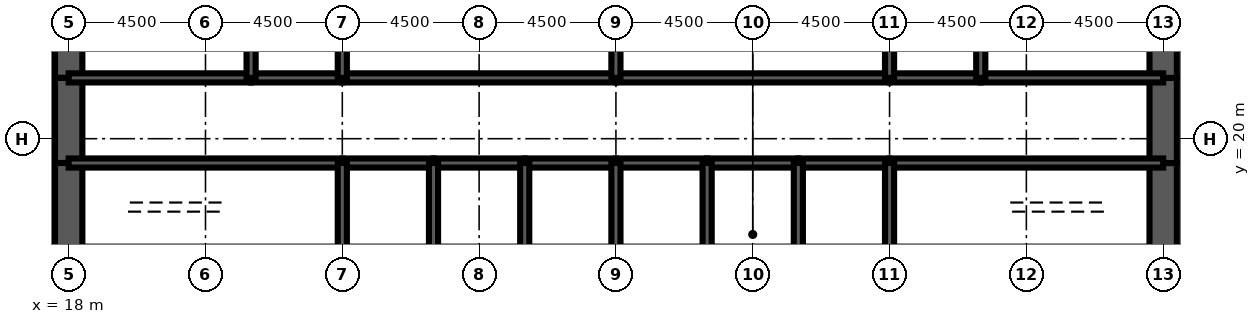
"""IFC4 building model, lengths in metres.
Left out: names, types, materials, properties, quantities, classifications, styles, units other than length and angle.
Written with IfcOpenShell. Run it as: python <this file> out.ifc"""

import sys

from ifc_helpers import new_model, si_unit, direction, frame, frame_2d, origin, place, context, subcontext, project, spatial, rectangle, extrude, element, fill, save


model = new_model("IFC4")
c1 = context("Model", 3, precision=1e-05, world=origin(), true_north=direction((0.0, 1.0)))
c2 = subcontext(c1, "Body", "Model", "MODEL_VIEW")
j1 = project(units=[si_unit("LENGTHUNIT", "METRE"), si_unit("PLANEANGLEUNIT", "RADIAN")], contexts=[c1])
p1 = place(None, origin())
s1 = spatial("IfcSite", under=j1, at=p1, CompositionType="ELEMENT")
p2 = place(p1, origin())
s2 = spatial("IfcBuilding", under=s1, at=p2, CompositionType="ELEMENT")
p3 = place(p2, frame((0.0, 0.0, 171.9)))
s3 = spatial("IfcBuildingStorey", under=s2, at=p3, CompositionType="ELEMENT", Elevation=171.9)
p4 = place(p3, frame((18.0, 26.0, 0.0), z_axis=(0.0, 0.0, 1.0), x_axis=(0.0, -1.0, 0.0)))
e1 = element("IfcWall", 1, at=p4, inside=s3, PredefinedType="SHEAR", context=c2, shape_type="SweptSolid", body=[
    extrude(rectangle(XDim=4.0, YDim=0.9, at=frame_2d((2.0, 0.0))), origin(), (0.0, 0.0, 1.0), 4.2),
])
p5 = place(p3, frame((18.0, 22.0, 0.0), z_axis=(0.0, 0.0, 1.0), x_axis=(0.0, -1.0, 0.0)))
e2 = element("IfcWall", 2, at=p5, inside=s3, PredefinedType="SHEAR", context=c2, shape_type="SweptSolid", body=[
    extrude(rectangle(XDim=2.8, YDim=0.9, at=frame_2d((1.4, 0.0))), origin(), (0.0, 0.0, 1.0), 4.2),
])
p6 = place(p5, frame((0.6, 0.0, 0.0)))
e3 = element("IfcOpeningElement", 3, at=p6, cuts=e2, PredefinedType="OPENING", context=c2, shape_type="SweptSolid", body=[
    extrude(rectangle(XDim=1.8, YDim=2.1, at=frame_2d((0.9, 1.05))), frame((0.0, 0.46, 0.0), z_axis=(0.0, -1.0, 0.0), x_axis=(1.0, 0.0, 0.0)), (0.0, 0.0, 1.0), 0.92),
])
for number, where, z_axis, x_axis in (
    (4, (18.0, 19.2, 0.0), (0.0, 0.0, 1.0), (0.0, -1.0, 0.0)),
    (5, (54.0, 16.0, 0.0), (0.0, 0.0, 1.0), (0.0, 1.0, 0.0)),
):
    element("IfcWall", number, at=place(p3, frame(where, z_axis=z_axis, x_axis=x_axis)), inside=s3, PredefinedType="SHEAR", context=c2, shape_type="SweptSolid", body=[
        extrude(rectangle(XDim=3.2, YDim=0.9, at=frame_2d((1.6, 0.0))), origin(), (0.0, 0.0, 1.0), 4.2),
    ])
p7 = place(p3, frame((54.0, 19.2, 0.0), z_axis=(0.0, 0.0, 1.0), x_axis=(0.0, 1.0, 0.0)))
e6 = element("IfcWall", 6, at=p7, inside=s3, PredefinedType="SHEAR", context=c2, shape_type="SweptSolid", body=[
    extrude(rectangle(XDim=2.8, YDim=0.9, at=frame_2d((1.4, 0.0))), origin(), (0.0, 0.0, 1.0), 4.2),
])
p8 = place(p7, frame((0.4, 0.0, 0.0)))
e7 = element("IfcOpeningElement", 7, at=p8, cuts=e6, PredefinedType="OPENING", context=c2, shape_type="SweptSolid", body=[
    extrude(rectangle(XDim=1.8, YDim=2.1, at=frame_2d((0.9, 1.05))), frame((0.0, 0.46, 0.0), z_axis=(0.0, -1.0, 0.0), x_axis=(1.0, 0.0, 0.0)), (0.0, 0.0, 1.0), 0.92),
])
p9 = place(p3, frame((54.0, 22.0, 0.0), z_axis=(0.0, 0.0, 1.0), x_axis=(0.0, 1.0, 0.0)))
e8 = element("IfcWall", 8, at=p9, inside=s3, PredefinedType="SHEAR", context=c2, shape_type="SweptSolid", body=[
    extrude(rectangle(XDim=4.0, YDim=0.9, at=frame_2d((2.0, 0.0))), origin(), (0.0, 0.0, 1.0), 4.2),
])
p10 = place(p3, frame((18.0, 19.2, 0.0), z_axis=(0.0, 0.0, 1.0), x_axis=(1.0, 0.0, 0.0)))
e9 = element("IfcWall", 9, at=p10, inside=s3, PredefinedType="SOLIDWALL", context=c2, shape_type="SweptSolid", body=[
    extrude(rectangle(XDim=9.0, YDim=0.3, at=frame_2d((4.5, 0.0))), origin(), (0.0, 0.0, 1.0), 4.2),
])
p11 = place(p10, frame((0.65, 0.0, 0.0)))
e10 = element("IfcOpeningElement", 10, at=p11, cuts=e9, PredefinedType="OPENING", context=c2, shape_type="SweptSolid", body=[
    extrude(rectangle(XDim=1.0, YDim=2.1, at=frame_2d((0.5, 1.05))), frame((0.0, 0.16, 0.0), z_axis=(0.0, -1.0, 0.0), x_axis=(1.0, 0.0, 0.0)), (0.0, 0.0, 1.0), 0.32),
])
p12 = place(p3, frame((27.0, 19.2, 0.0), z_axis=(0.0, 0.0, 1.0), x_axis=(1.0, 0.0, 0.0)))
e11 = element("IfcWall", 11, at=p12, inside=s3, PredefinedType="SOLIDWALL", context=c2, shape_type="SweptSolid", body=[
    extrude(rectangle(XDim=3.0, YDim=0.3, at=frame_2d((1.5, 0.0))), origin(), (0.0, 0.0, 1.0), 4.2),
])
p13 = place(p12, frame((0.95, 0.0, 0.0)))
e12 = element("IfcOpeningElement", 12, at=p13, cuts=e11, PredefinedType="OPENING", context=c2, shape_type="SweptSolid", body=[
    extrude(rectangle(XDim=1.1, YDim=2.2, at=frame_2d((0.55, 1.1))), frame((0.0, 0.16, 0.0), z_axis=(0.0, -1.0, 0.0), x_axis=(1.0, 0.0, 0.0)), (0.0, 0.0, 1.0), 0.32),
])
p14 = place(p3, frame((30.0, 19.2, 0.0), z_axis=(0.0, 0.0, 1.0), x_axis=(1.0, 0.0, 0.0)))
e13 = element("IfcWall", 13, at=p14, inside=s3, PredefinedType="SOLIDWALL", context=c2, shape_type="SweptSolid", body=[
    extrude(rectangle(XDim=3.0, YDim=0.3, at=frame_2d((1.5, 0.0))), origin(), (0.0, 0.0, 1.0), 4.2),
])
p15 = place(p14, frame((0.95, 0.0, 0.0)))
e14 = element("IfcOpeningElement", 14, at=p15, cuts=e13, PredefinedType="OPENING", context=c2, shape_type="SweptSolid", body=[
    extrude(rectangle(XDim=1.1, YDim=2.2, at=frame_2d((0.55, 1.1))), frame((0.0, 0.16, 0.0), z_axis=(0.0, -1.0, 0.0), x_axis=(1.0, 0.0, 0.0)), (0.0, 0.0, 1.0), 0.32),
])
p16 = place(p3, frame((33.0, 19.2, 0.0), z_axis=(0.0, 0.0, 1.0), x_axis=(1.0, 0.0, 0.0)))
e15 = element("IfcWall", 15, at=p16, inside=s3, PredefinedType="SOLIDWALL", context=c2, shape_type="SweptSolid", body=[
    extrude(rectangle(XDim=3.0, YDim=0.3, at=frame_2d((1.5, 0.0))), origin(), (0.0, 0.0, 1.0), 4.2),
])
p17 = place(p16, frame((0.95, 0.0, 0.0)))
e16 = element("IfcOpeningElement", 16, at=p17, cuts=e15, PredefinedType="OPENING", context=c2, shape_type="SweptSolid", body=[
    extrude(rectangle(XDim=1.1, YDim=2.2, at=frame_2d((0.55, 1.1))), frame((0.0, 0.16, 0.0), z_axis=(0.0, -1.0, 0.0), x_axis=(1.0, 0.0, 0.0)), (0.0, 0.0, 1.0), 0.32),
])
p18 = place(p3, frame((36.0, 19.2, 0.0), z_axis=(0.0, 0.0, 1.0), x_axis=(1.0, 0.0, 0.0)))
e17 = element("IfcWall", 17, at=p18, inside=s3, PredefinedType="SOLIDWALL", context=c2, shape_type="SweptSolid", body=[
    extrude(rectangle(XDim=3.0, YDim=0.3, at=frame_2d((1.5, 0.0))), origin(), (0.0, 0.0, 1.0), 4.2),
])
p19 = place(p18, frame((0.95, 0.0, 0.0)))
e18 = element("IfcOpeningElement", 18, at=p19, cuts=e17, PredefinedType="OPENING", context=c2, shape_type="SweptSolid", body=[
    extrude(rectangle(XDim=1.1, YDim=2.2, at=frame_2d((0.55, 1.1))), frame((0.0, 0.16, 0.0), z_axis=(0.0, -1.0, 0.0), x_axis=(1.0, 0.0, 0.0)), (0.0, 0.0, 1.0), 0.32),
])
p20 = place(p3, frame((39.0, 19.2, 0.0), z_axis=(0.0, 0.0, 1.0), x_axis=(1.0, 0.0, 0.0)))
e19 = element("IfcWall", 19, at=p20, inside=s3, PredefinedType="SOLIDWALL", context=c2, shape_type="SweptSolid", body=[
    extrude(rectangle(XDim=3.0, YDim=0.3, at=frame_2d((1.5, 0.0))), origin(), (0.0, 0.0, 1.0), 4.2),
])
p21 = place(p20, frame((1.0, 0.0, 0.0)))
e20 = element("IfcOpeningElement", 20, at=p21, cuts=e19, PredefinedType="OPENING", context=c2, shape_type="SweptSolid", body=[
    extrude(rectangle(XDim=1.0, YDim=2.1, at=frame_2d((0.5, 1.05))), frame((0.0, 0.16, 0.0), z_axis=(0.0, -1.0, 0.0), x_axis=(1.0, 0.0, 0.0)), (0.0, 0.0, 1.0), 0.32),
])
p22 = place(p3, frame((42.0, 19.2, 0.0), z_axis=(0.0, 0.0, 1.0), x_axis=(1.0, 0.0, 0.0)))
e21 = element("IfcWall", 21, at=p22, inside=s3, PredefinedType="SOLIDWALL", context=c2, shape_type="SweptSolid", body=[
    extrude(rectangle(XDim=3.0, YDim=0.3, at=frame_2d((1.5, 0.0))), origin(), (0.0, 0.0, 1.0), 4.2),
])
p23 = place(p3, frame((45.0, 19.2, 0.0), z_axis=(0.0, 0.0, 1.0), x_axis=(1.0, 0.0, 0.0)))
e22 = element("IfcWall", 22, at=p23, inside=s3, PredefinedType="SOLIDWALL", context=c2, shape_type="SweptSolid", body=[
    extrude(rectangle(XDim=9.0, YDim=0.3, at=frame_2d((4.5, 0.0))), origin(), (0.0, 0.0, 1.0), 4.2),
])
p24 = place(p23, frame((7.35, 0.0, 0.0)))
e23 = element("IfcOpeningElement", 23, at=p24, cuts=e22, PredefinedType="OPENING", context=c2, shape_type="SweptSolid", body=[
    extrude(rectangle(XDim=1.0, YDim=2.1, at=frame_2d((0.5, 1.05))), frame((0.0, 0.16, 0.0), z_axis=(0.0, -1.0, 0.0), x_axis=(1.0, 0.0, 0.0)), (0.0, 0.0, 1.0), 0.32),
])
p25 = place(p3, frame((18.0, 22.0, 0.0), z_axis=(0.0, 0.0, 1.0), x_axis=(1.0, 0.0, 0.0)))
e24 = element("IfcWall", 24, at=p25, inside=s3, PredefinedType="SOLIDWALL", context=c2, shape_type="SweptSolid", body=[
    extrude(rectangle(XDim=6.0, YDim=0.3, at=frame_2d((3.0, 0.0))), origin(), (0.0, 0.0, 1.0), 4.2),
])
p26 = place(p25, frame((4.4, 0.0, 0.0)))
e25 = element("IfcOpeningElement", 25, at=p26, cuts=e24, PredefinedType="OPENING", context=c2, shape_type="SweptSolid", body=[
    extrude(rectangle(XDim=1.0, YDim=2.1, at=frame_2d((0.5, 1.05))), frame((0.0, 0.16, 0.0), z_axis=(0.0, -1.0, 0.0), x_axis=(1.0, 0.0, 0.0)), (0.0, 0.0, 1.0), 0.32),
])
p27 = place(p25, frame((0.7, 0.0, 0.0)))
e26 = element("IfcOpeningElement", 26, at=p27, cuts=e24, PredefinedType="OPENING", context=c2, shape_type="SweptSolid", body=[
    extrude(rectangle(XDim=1.0, YDim=2.1, at=frame_2d((0.5, 1.05))), frame((0.0, 0.16, 0.0), z_axis=(0.0, -1.0, 0.0), x_axis=(1.0, 0.0, 0.0)), (0.0, 0.0, 1.0), 0.32),
])
p28 = place(p3, frame((24.0, 22.0, 0.0), z_axis=(0.0, 0.0, 1.0), x_axis=(1.0, 0.0, 0.0)))
e27 = element("IfcWall", 27, at=p28, inside=s3, PredefinedType="SOLIDWALL", context=c2, shape_type="SweptSolid", body=[
    extrude(rectangle(XDim=3.0, YDim=0.3, at=frame_2d((1.5, 0.0))), origin(), (0.0, 0.0, 1.0), 4.2),
])
p29 = place(p28, frame((1.0, 0.0, 0.0)))
e28 = element("IfcOpeningElement", 28, at=p29, cuts=e27, PredefinedType="OPENING", context=c2, shape_type="SweptSolid", body=[
    extrude(rectangle(XDim=1.0, YDim=2.1, at=frame_2d((0.5, 1.05))), frame((0.0, 0.16, 0.0), z_axis=(0.0, -1.0, 0.0), x_axis=(1.0, 0.0, 0.0)), (0.0, 0.0, 1.0), 0.32),
])
p30 = place(p3, frame((27.0, 22.0, 0.0), z_axis=(0.0, 0.0, 1.0), x_axis=(1.0, 0.0, 0.0)))
e29 = element("IfcWall", 29, at=p30, inside=s3, PredefinedType="SOLIDWALL", context=c2, shape_type="SweptSolid", body=[
    extrude(rectangle(XDim=9.0, YDim=0.3, at=frame_2d((4.5, 0.0))), origin(), (0.0, 0.0, 1.0), 4.2),
])
p31 = place(p30, frame((4.0, 0.0, 0.0)))
e30 = element("IfcOpeningElement", 30, at=p31, cuts=e29, PredefinedType="OPENING", context=c2, shape_type="SweptSolid", body=[
    extrude(rectangle(XDim=1.0, YDim=2.1, at=frame_2d((0.5, 1.05))), frame((0.0, 0.16, 0.0), z_axis=(0.0, -1.0, 0.0), x_axis=(1.0, 0.0, 0.0)), (0.0, 0.0, 1.0), 0.32),
])
p32 = place(p3, frame((36.0, 22.0, 0.0), z_axis=(0.0, 0.0, 1.0), x_axis=(1.0, 0.0, 0.0)))
e31 = element("IfcWall", 31, at=p32, inside=s3, PredefinedType="SOLIDWALL", context=c2, shape_type="SweptSolid", body=[
    extrude(rectangle(XDim=9.0, YDim=0.3, at=frame_2d((4.5, 0.0))), origin(), (0.0, 0.0, 1.0), 4.2),
])
p33 = place(p32, frame((4.0, 0.0, 0.0)))
e32 = element("IfcOpeningElement", 32, at=p33, cuts=e31, PredefinedType="OPENING", context=c2, shape_type="SweptSolid", body=[
    extrude(rectangle(XDim=1.0, YDim=2.1, at=frame_2d((0.5, 1.05))), frame((0.0, 0.16, 0.0), z_axis=(0.0, -1.0, 0.0), x_axis=(1.0, 0.0, 0.0)), (0.0, 0.0, 1.0), 0.32),
])
p34 = place(p3, frame((45.0, 22.0, 0.0), z_axis=(0.0, 0.0, 1.0), x_axis=(1.0, 0.0, 0.0)))
e33 = element("IfcWall", 33, at=p34, inside=s3, PredefinedType="SOLIDWALL", context=c2, shape_type="SweptSolid", body=[
    extrude(rectangle(XDim=3.0, YDim=0.3, at=frame_2d((1.5, 0.0))), origin(), (0.0, 0.0, 1.0), 4.2),
])
p35 = place(p34, frame((1.0, 0.0, 0.0)))
e34 = element("IfcOpeningElement", 34, at=p35, cuts=e33, PredefinedType="OPENING", context=c2, shape_type="SweptSolid", body=[
    extrude(rectangle(XDim=1.0, YDim=2.1, at=frame_2d((0.5, 1.05))), frame((0.0, 0.16, 0.0), z_axis=(0.0, -1.0, 0.0), x_axis=(1.0, 0.0, 0.0)), (0.0, 0.0, 1.0), 0.32),
])
p36 = place(p3, frame((48.0, 22.0, 0.0), z_axis=(0.0, 0.0, 1.0), x_axis=(1.0, 0.0, 0.0)))
e35 = element("IfcWall", 35, at=p36, inside=s3, PredefinedType="SOLIDWALL", context=c2, shape_type="SweptSolid", body=[
    extrude(rectangle(XDim=6.0, YDim=0.3, at=frame_2d((3.0, 0.0))), origin(), (0.0, 0.0, 1.0), 4.2),
])
p37 = place(p36, frame((2.0, 0.0, 0.0)))
e36 = element("IfcOpeningElement", 36, at=p37, cuts=e35, PredefinedType="OPENING", context=c2, shape_type="SweptSolid", body=[
    extrude(rectangle(XDim=1.0, YDim=2.1, at=frame_2d((0.5, 1.05))), frame((0.0, 0.16, 0.0), z_axis=(0.0, -1.0, 0.0), x_axis=(1.0, 0.0, 0.0)), (0.0, 0.0, 1.0), 0.32),
])
p38 = place(p36, frame((4.15, 0.0, 0.0)))
e37 = element("IfcOpeningElement", 37, at=p38, cuts=e35, PredefinedType="OPENING", context=c2, shape_type="SweptSolid", body=[
    extrude(rectangle(XDim=1.0, YDim=2.1, at=frame_2d((0.5, 1.05))), frame((0.0, 0.16, 0.0), z_axis=(0.0, -1.0, 0.0), x_axis=(1.0, 0.0, 0.0)), (0.0, 0.0, 1.0), 0.32),
])
for number, where, z_axis, x_axis in (
    (38, (27.0, 16.0, 0.0), (0.0, 0.0, 1.0), (0.0, 1.0, 0.0)),
    (39, (30.0, 16.0, 0.0), (0.0, 0.0, 1.0), (0.0, 1.0, 0.0)),
    (40, (33.0, 16.0, 0.0), (0.0, 0.0, 1.0), (0.0, 1.0, 0.0)),
    (41, (36.0, 16.0, 0.0), (0.0, 0.0, 1.0), (0.0, 1.0, 0.0)),
    (42, (39.0, 16.0, 0.0), (0.0, 0.0, 1.0), (0.0, 1.0, 0.0)),
    (43, (42.0, 16.0, 0.0), (0.0, 0.0, 1.0), (0.0, 1.0, 0.0)),
    (44, (45.0, 16.0, 0.0), (0.0, 0.0, 1.0), (0.0, 1.0, 0.0)),
):
    element("IfcWall", number, at=place(p3, frame(where, z_axis=z_axis, x_axis=x_axis)), inside=s3, PredefinedType="SOLIDWALL", context=c2, shape_type="SweptSolid", body=[
        extrude(rectangle(XDim=3.2, YDim=0.3, at=frame_2d((1.6, 0.0))), origin(), (0.0, 0.0, 1.0), 4.2),
    ])
for number, where, z_axis, x_axis in (
    (45, (24.0, 22.0, 0.0), (0.0, 0.0, 1.0), (0.0, 1.0, 0.0)),
    (46, (27.0, 22.0, 0.0), (0.0, 0.0, 1.0), (0.0, 1.0, 0.0)),
    (47, (36.0, 22.0, 0.0), (0.0, 0.0, 1.0), (0.0, 1.0, 0.0)),
    (48, (45.0, 22.0, 0.0), (0.0, 0.0, 1.0), (0.0, 1.0, 0.0)),
    (49, (48.0, 22.0, 0.0), (0.0, 0.0, 1.0), (0.0, 1.0, 0.0)),
):
    element("IfcWall", number, at=place(p3, frame(where, z_axis=z_axis, x_axis=x_axis)), inside=s3, PredefinedType="SOLIDWALL", context=c2, shape_type="SweptSolid", body=[
        extrude(rectangle(XDim=4.0, YDim=0.3, at=frame_2d((2.0, 0.0))), origin(), (0.0, 0.0, 1.0), 4.2),
    ])
p39 = place(p3, frame((39.15, 17.4, 0.0), z_axis=(0.0, 0.0, 1.0), x_axis=(1.0, 0.0, 0.0)))
e50 = element("IfcWall", 50, at=p39, inside=s3, PredefinedType="SOLIDWALL", context=c2, shape_type="SweptSolid", body=[
    extrude(rectangle(XDim=2.7, YDim=0.3, at=frame_2d((1.35, 0.0))), origin(), (0.0, 0.0, 1.0), 4.04),
])
p40 = place(p39, frame((0.85, 0.0, 0.0)))
e51 = element("IfcOpeningElement", 51, at=p40, cuts=e50, PredefinedType="OPENING", context=c2, shape_type="SweptSolid", body=[
    extrude(rectangle(XDim=1.0, YDim=2.1, at=frame_2d((0.5, 1.05))), frame((0.0, 0.16, 0.0), z_axis=(0.0, -1.0, 0.0), x_axis=(1.0, 0.0, 0.0)), (0.0, 0.0, 1.0), 0.32),
])
p41 = place(p3, frame((42.0, 22.15, 0.0), z_axis=(0.0, 0.0, 1.0), x_axis=(0.0, 1.0, 0.0)))
e52 = element("IfcWall", 52, at=p41, inside=s3, PredefinedType="PARTITIONING", context=c2, shape_type="SweptSolid", body=[
    extrude(rectangle(XDim=3.7, YDim=0.15, at=frame_2d((1.85, 0.0))), origin(), (0.0, 0.0, 1.0), 3.0),
])
p42 = place(p41, frame((2.2, 0.0, 0.0)))
e53 = element("IfcOpeningElement", 53, at=p42, cuts=e52, PredefinedType="OPENING", context=c2, shape_type="SweptSolid", body=[
    extrude(rectangle(XDim=1.0, YDim=2.1, at=frame_2d((0.5, 1.05))), frame((0.0, 0.085, 0.0), z_axis=(0.0, -1.0, 0.0), x_axis=(1.0, 0.0, 0.0)), (0.0, 0.0, 1.0), 0.17),
])
for number, where, z_axis, x_axis in (
    (54, (20.025, 22.15, 0.0), (0.0, 0.0, 1.0), (0.0, 1.0, 0.0)),
    (55, (51.675, 22.15, 0.0), (0.0, 0.0, 1.0), (0.0, 1.0, 0.0)),
):
    element("IfcWall", number, at=place(p3, frame(where, z_axis=z_axis, x_axis=x_axis)), inside=s3, PredefinedType="PARTITIONING", context=c2, shape_type="SweptSolid", body=[
        extrude(rectangle(XDim=3.7, YDim=0.15, at=frame_2d((1.85, 0.0))), origin(), (0.0, 0.0, 1.0), 3.0),
    ])
p43 = place(p40, origin())
e56 = element("IfcDoor", 56, at=p43, inside=s3, OperationType="SINGLE_SWING_LEFT", PredefinedType="DOOR", context=c2, shape_type="SweptSolid", body=[
    extrude(rectangle(XDim=1.0, YDim=2.1, at=frame_2d((0.5, 1.05))), frame((0.0, 0.025, 0.0), z_axis=(0.0, -1.0, 0.0), x_axis=(1.0, 0.0, 0.0)), (0.0, 0.0, 1.0), 0.05),
])
fill(e51, e56)
p44 = place(p13, origin())
e57 = element("IfcDoor", 57, at=p44, inside=s3, OperationType="DOUBLE_DOOR_SLIDING", PredefinedType="USERDEFINED", context=c2, shape_type="SweptSolid", body=[
    extrude(rectangle(XDim=1.1, YDim=2.2, at=frame_2d((0.55, 1.1))), frame((0.0, 0.025, 0.0), z_axis=(0.0, -1.0, 0.0), x_axis=(1.0, 0.0, 0.0)), (0.0, 0.0, 1.0), 0.05),
])
fill(e12, e57)
p45 = place(p15, origin())
e58 = element("IfcDoor", 58, at=p45, inside=s3, OperationType="DOUBLE_DOOR_SLIDING", PredefinedType="USERDEFINED", context=c2, shape_type="SweptSolid", body=[
    extrude(rectangle(XDim=1.1, YDim=2.2, at=frame_2d((0.55, 1.1))), frame((0.0, 0.025, 0.0), z_axis=(0.0, -1.0, 0.0), x_axis=(1.0, 0.0, 0.0)), (0.0, 0.0, 1.0), 0.05),
])
fill(e14, e58)
p46 = place(p17, origin())
e59 = element("IfcDoor", 59, at=p46, inside=s3, OperationType="DOUBLE_DOOR_SLIDING", PredefinedType="USERDEFINED", context=c2, shape_type="SweptSolid", body=[
    extrude(rectangle(XDim=1.1, YDim=2.2, at=frame_2d((0.55, 1.1))), frame((0.0, 0.025, 0.0), z_axis=(0.0, -1.0, 0.0), x_axis=(1.0, 0.0, 0.0)), (0.0, 0.0, 1.0), 0.05),
])
fill(e16, e59)
p47 = place(p19, origin())
e60 = element("IfcDoor", 60, at=p47, inside=s3, OperationType="DOUBLE_DOOR_SLIDING", PredefinedType="USERDEFINED", context=c2, shape_type="SweptSolid", body=[
    extrude(rectangle(XDim=1.1, YDim=2.2, at=frame_2d((0.55, 1.1))), frame((0.0, 0.025, 0.0), z_axis=(0.0, -1.0, 0.0), x_axis=(1.0, 0.0, 0.0)), (0.0, 0.0, 1.0), 0.05),
])
fill(e18, e60)
p48 = place(p11, origin())
e61 = element("IfcDoor", 61, at=p48, inside=s3, OperationType="SINGLE_SWING_LEFT", PredefinedType="DOOR", context=c2, shape_type="SweptSolid", body=[
    extrude(rectangle(XDim=1.0, YDim=2.1, at=frame_2d((0.5, 1.05))), frame((0.0, 0.025, 0.0), z_axis=(0.0, -1.0, 0.0), x_axis=(1.0, 0.0, 0.0)), (0.0, 0.0, 1.0), 0.05),
])
fill(e10, e61)
p49 = place(p24, origin())
e62 = element("IfcDoor", 62, at=p49, inside=s3, OperationType="SINGLE_SWING_RIGHT", PredefinedType="DOOR", context=c2, shape_type="SweptSolid", body=[
    extrude(rectangle(XDim=1.0, YDim=2.1, at=frame_2d((0.5, 1.05))), frame((0.0, 0.025, 0.0), z_axis=(0.0, -1.0, 0.0), x_axis=(1.0, 0.0, 0.0)), (0.0, 0.0, 1.0), 0.05),
])
fill(e23, e62)
p50 = place(p6, origin())
e63 = element("IfcDoor", 63, at=p50, inside=s3, OperationType="SINGLE_SWING_LEFT", PredefinedType="DOOR", context=c2, shape_type="SweptSolid", body=[
    extrude(rectangle(XDim=1.8, YDim=2.1, at=frame_2d((0.9, 1.05))), frame((0.0, 0.45, 0.0), z_axis=(0.0, -1.0, 0.0), x_axis=(1.0, 0.0, 0.0)), (0.0, 0.0, 1.0), 0.899),
])
fill(e3, e63)
p51 = place(p8, origin())
e64 = element("IfcDoor", 64, at=p51, inside=s3, OperationType="SINGLE_SWING_LEFT", PredefinedType="DOOR", context=c2, shape_type="SweptSolid", body=[
    extrude(rectangle(XDim=1.8, YDim=2.1, at=frame_2d((0.9, 1.05))), frame((0.0, 0.45, 0.0), z_axis=(0.0, -1.0, 0.0), x_axis=(1.0, 0.0, 0.0)), (0.0, 0.0, 1.0), 0.899),
])
fill(e7, e64)
p52 = place(p26, origin())
e65 = element("IfcDoor", 65, at=p52, inside=s3, OperationType="SINGLE_SWING_RIGHT", PredefinedType="DOOR", context=c2, shape_type="SweptSolid", body=[
    extrude(rectangle(XDim=1.0, YDim=2.1, at=frame_2d((0.5, 1.05))), frame((0.0, 0.025, 0.0), z_axis=(0.0, -1.0, 0.0), x_axis=(1.0, 0.0, 0.0)), (0.0, 0.0, 1.0), 0.05),
])
fill(e25, e65)
p53 = place(p29, origin())
e66 = element("IfcDoor", 66, at=p53, inside=s3, OperationType="SINGLE_SWING_LEFT", PredefinedType="DOOR", context=c2, shape_type="SweptSolid", body=[
    extrude(rectangle(XDim=1.0, YDim=2.1, at=frame_2d((0.5, 1.05))), frame((0.0, 0.025, 0.0), z_axis=(0.0, -1.0, 0.0), x_axis=(1.0, 0.0, 0.0)), (0.0, 0.0, 1.0), 0.05),
])
fill(e28, e66)
p54 = place(p31, origin())
e67 = element("IfcDoor", 67, at=p54, inside=s3, OperationType="SINGLE_SWING_LEFT", PredefinedType="DOOR", context=c2, shape_type="SweptSolid", body=[
    extrude(rectangle(XDim=1.0, YDim=2.1, at=frame_2d((0.5, 1.05))), frame((0.0, 0.025, 0.0), z_axis=(0.0, -1.0, 0.0), x_axis=(1.0, 0.0, 0.0)), (0.0, 0.0, 1.0), 0.05),
])
fill(e30, e67)
p55 = place(p33, origin())
e68 = element("IfcDoor", 68, at=p55, inside=s3, OperationType="SINGLE_SWING_LEFT", PredefinedType="DOOR", context=c2, shape_type="SweptSolid", body=[
    extrude(rectangle(XDim=1.0, YDim=2.1, at=frame_2d((0.5, 1.05))), frame((0.0, 0.025, 0.0), z_axis=(0.0, -1.0, 0.0), x_axis=(1.0, 0.0, 0.0)), (0.0, 0.0, 1.0), 0.05),
])
fill(e32, e68)
p56 = place(p35, origin())
e69 = element("IfcDoor", 69, at=p56, inside=s3, OperationType="SINGLE_SWING_LEFT", PredefinedType="DOOR", context=c2, shape_type="SweptSolid", body=[
    extrude(rectangle(XDim=1.0, YDim=2.1, at=frame_2d((0.5, 1.05))), frame((0.0, 0.025, 0.0), z_axis=(0.0, -1.0, 0.0), x_axis=(1.0, 0.0, 0.0)), (0.0, 0.0, 1.0), 0.05),
])
fill(e34, e69)
p57 = place(p37, origin())
e70 = element("IfcDoor", 70, at=p57, inside=s3, OperationType="SINGLE_SWING_LEFT", PredefinedType="DOOR", context=c2, shape_type="SweptSolid", body=[
    extrude(rectangle(XDim=1.0, YDim=2.1, at=frame_2d((0.5, 1.05))), frame((0.0, 0.025, 0.0), z_axis=(0.0, -1.0, 0.0), x_axis=(1.0, 0.0, 0.0)), (0.0, 0.0, 1.0), 0.05),
])
fill(e36, e70)
p58 = place(p27, origin())
e71 = element("IfcDoor", 71, at=p58, inside=s3, OperationType="SINGLE_SWING_LEFT", PredefinedType="DOOR", context=c2, shape_type="SweptSolid", body=[
    extrude(rectangle(XDim=1.0, YDim=2.1, at=frame_2d((0.5, 1.05))), frame((0.0, 0.025, 0.0), z_axis=(0.0, -1.0, 0.0), x_axis=(1.0, 0.0, 0.0)), (0.0, 0.0, 1.0), 0.05),
])
fill(e26, e71)
p59 = place(p38, origin())
e72 = element("IfcDoor", 72, at=p59, inside=s3, OperationType="SINGLE_SWING_RIGHT", PredefinedType="DOOR", context=c2, shape_type="SweptSolid", body=[
    extrude(rectangle(XDim=1.0, YDim=2.1, at=frame_2d((0.5, 1.05))), frame((0.0, 0.025, 0.0), z_axis=(0.0, -1.0, 0.0), x_axis=(1.0, 0.0, 0.0)), (0.0, 0.0, 1.0), 0.05),
])
fill(e37, e72)
p60 = place(p21, origin())
e73 = element("IfcDoor", 73, at=p60, inside=s3, OperationType="SINGLE_SWING_LEFT", PredefinedType="DOOR", context=c2, shape_type="SweptSolid", body=[
    extrude(rectangle(XDim=1.0, YDim=2.1, at=frame_2d((0.5, 1.05))), frame((0.0, 0.025, 0.0), z_axis=(0.0, -1.0, 0.0), x_axis=(1.0, 0.0, 0.0)), (0.0, 0.0, 1.0), 0.05),
])
fill(e20, e73)
save(model, sys.argv[1])
